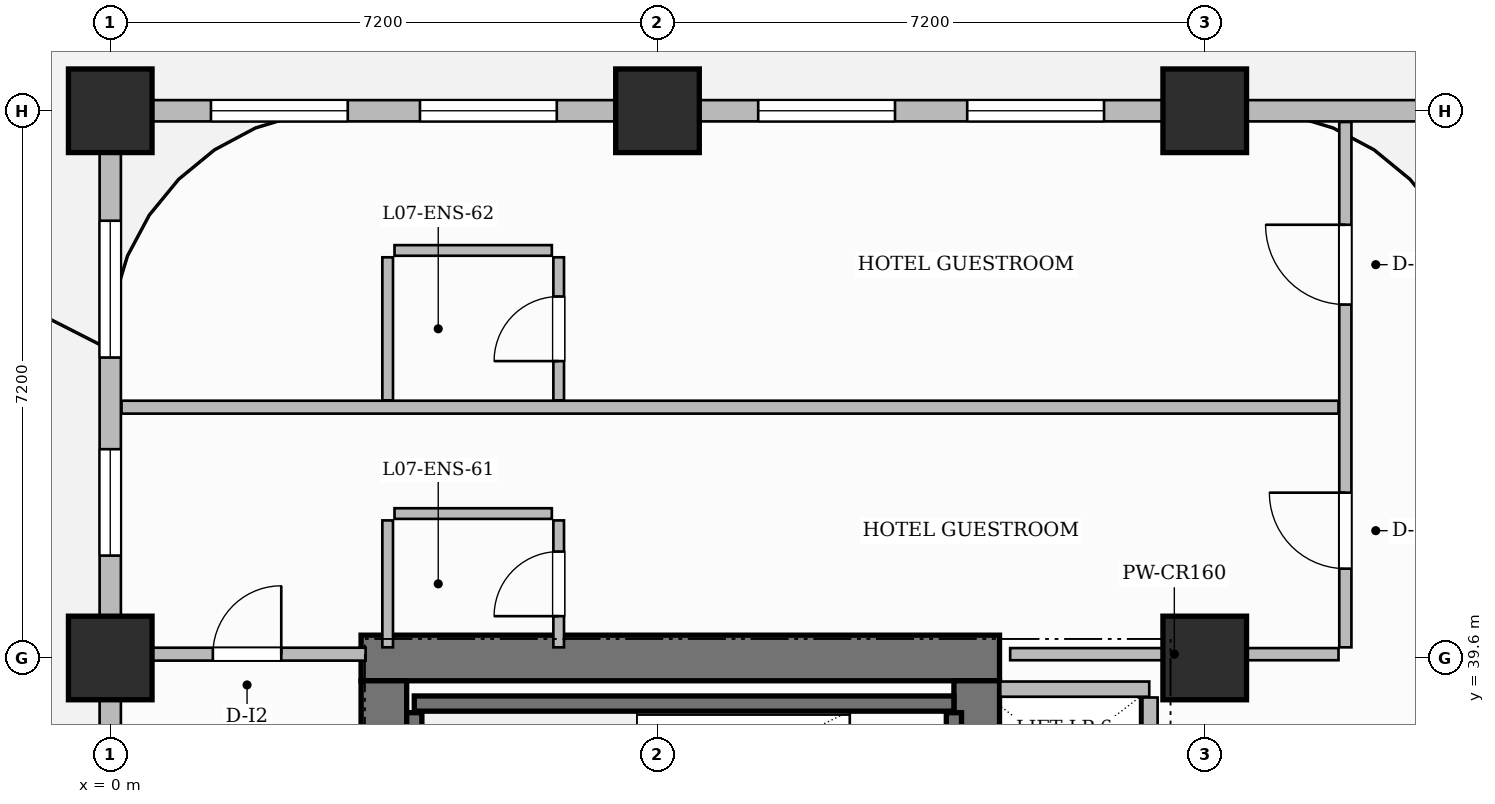
"""IFC4 building model, lengths in metres.
Left out: names, types, materials, properties, quantities, classifications, styles, units other than length and angle.
Written with IfcOpenShell. Run it as: python <this file> out.ifc"""

import sys

from ifc_helpers import new_model, si_unit, direction, frame, frame_2d, origin, origin_2d, place, context, subcontext, project, spatial, rectangle, extrude, source, transform, mapped, element, fill, save


model = new_model("IFC4")
c1 = context("Model", 3, precision=1e-05, world=origin(), true_north=direction((0.0, 1.0)))
c2 = subcontext(c1, "Body", "Model", "MODEL_VIEW")
j1 = project(units=[si_unit("LENGTHUNIT", "METRE"), si_unit("PLANEANGLEUNIT", "RADIAN")], contexts=[c1])
p1 = place(None, origin())
s1 = spatial("IfcSite", under=j1, at=p1, CompositionType="ELEMENT")
p2 = place(p1, origin())
s2 = spatial("IfcBuilding", under=s1, at=p2, CompositionType="ELEMENT")
p3 = place(p2, frame((0.0, 0.0, 36.1)))
s3 = spatial("IfcBuildingStorey", under=s2, at=p3, CompositionType="ELEMENT", Elevation=36.1)
p4 = place(p3, frame((3.3, 39.6, 0.0), z_axis=(0.0, 0.0, 1.0), x_axis=(1.0, 0.0, 0.0)))
e1 = element("IfcWall", 1, at=p4, inside=s3, PredefinedType="SHEAR", context=c2, shape_type="SweptSolid", body=[
    extrude(rectangle(XDim=8.4, YDim=0.6, at=frame_2d((4.2, 0.0))), origin(), (0.0, 0.0, 1.0), 3.7),
])
p5 = place(p3, frame((3.6, 25.5, 0.0), z_axis=(0.0, 0.0, 1.0), x_axis=(0.0, 1.0, 0.0)))
e2 = element("IfcWall", 2, at=p5, inside=s3, PredefinedType="SHEAR", context=c2, shape_type="SweptSolid", body=[
    extrude(rectangle(XDim=13.8, YDim=0.6, at=frame_2d((6.9, 0.0))), origin(), (0.0, 0.0, 1.0), 3.7),
])
p6 = place(p3, frame((11.4, 25.5, 0.0), z_axis=(0.0, 0.0, 1.0), x_axis=(0.0, 1.0, 0.0)))
e3 = element("IfcWall", 3, at=p6, inside=s3, PredefinedType="SHEAR", context=c2, shape_type="SweptSolid", body=[
    extrude(rectangle(XDim=13.8, YDim=0.6, at=frame_2d((6.9, 0.0))), origin(), (0.0, 0.0, 1.0), 3.7),
])
p7 = place(p6, frame((6.47, 0.0, 0.0)))
e4 = element("IfcOpeningElement", 4, at=p7, cuts=e3, PredefinedType="OPENING", context=c2, shape_type="SweptSolid", body=[
    extrude(rectangle(XDim=1.5, YDim=2.2, at=frame_2d((0.75, 1.1))), frame((0.0, 0.31, 0.0), z_axis=(0.0, -1.0, 0.0), x_axis=(1.0, 0.0, 0.0)), (0.0, 0.0, 1.0), 0.62),
])
m1 = source(origin(), c2, "Body", "SweptSolid", [
    extrude(rectangle(XDim=1.1, YDim=1.1, at=origin_2d()), origin(), (0.0, 0.0, 1.0), 3.7),
])
for number, where, z_axis, x_axis in (
    (5, (0.0, 39.6, 0.0), (0.0, 0.0, 1.0), (1.0, 0.0, 0.0)),
    (6, (0.0, 46.8, 0.0), (0.0, 0.0, 1.0), (1.0, 0.0, 0.0)),
    (7, (7.2, 46.8, 0.0), (0.0, 0.0, 1.0), (1.0, 0.0, 0.0)),
    (8, (14.4, 39.6, 0.0), (0.0, 0.0, 1.0), (1.0, 0.0, 0.0)),
    (9, (14.4, 46.8, 0.0), (0.0, 0.0, 1.0), (1.0, 0.0, 0.0)),
):
    element("IfcColumn", number, at=place(p3, frame(where, z_axis=z_axis, x_axis=x_axis)), inside=s3, PredefinedType="COLUMN", context=c2, shape_type="MappedRepresentation", body=[
        mapped(m1, transform((0.0, 0.0, 0.0), scale=1.0)),
    ])
p8 = place(p3, frame((4.0, 39.0, 0.0), z_axis=(0.0, 0.0, 1.0), x_axis=(1.0, 0.0, 0.0)))
e10 = element("IfcWall", 10, at=p8, inside=s3, PredefinedType="SHEAR", context=c2, shape_type="SweptSolid", body=[
    extrude(rectangle(XDim=7.1, YDim=0.2, at=frame_2d((3.55, 0.0))), origin(), (0.0, 0.0, 1.0), 3.7),
])
for number, where, z_axis, x_axis in (
    (11, (4.0, 36.18, 0.0), (0.0, 0.0, 1.0), (0.0, 1.0, 0.0)),
    (12, (11.1, 36.18, 0.0), (0.0, 0.0, 1.0), (0.0, 1.0, 0.0)),
):
    element("IfcWall", number, at=place(p3, frame(where, z_axis=z_axis, x_axis=x_axis)), inside=s3, PredefinedType="SHEAR", context=c2, shape_type="SweptSolid", body=[
        extrude(rectangle(XDim=2.7, YDim=0.2, at=frame_2d((1.35, 0.0))), origin(), (0.0, 0.0, 1.0), 3.7),
    ])
p9 = place(p3, frame((11.71, 39.19, 0.0), z_axis=(0.0, 0.0, 1.0), x_axis=(1.0, 0.0, 0.0)))
e13 = element("IfcWall", 13, at=p9, inside=s3, PredefinedType="PARTITIONING", context=c2, shape_type="SweptSolid", body=[
    extrude(rectangle(XDim=1.96, YDim=0.2, at=frame_2d((0.98, 0.0))), origin(), (0.0, 0.0, 1.0), 3.45),
])
p10 = place(p3, frame((13.68, 34.36, 0.0), z_axis=(0.0, 0.0, 1.0), x_axis=(0.0, 1.0, 0.0)))
e14 = element("IfcWall", 14, at=p10, inside=s3, PredefinedType="PARTITIONING", context=c2, shape_type="SweptSolid", body=[
    extrude(rectangle(XDim=4.72, YDim=0.2, at=frame_2d((2.36, 0.0))), origin(), (0.0, 0.0, 1.0), 3.45),
])
p11 = place(p3, frame((16.25, 39.74, 0.0), z_axis=(0.0, 0.0, 1.0), x_axis=(0.0, 1.0, 0.0)))
e15 = element("IfcWall", 15, at=p11, inside=s3, PredefinedType="PARTITIONING", context=c2, shape_type="SweptSolid", body=[
    extrude(rectangle(XDim=6.912, YDim=0.16, at=frame_2d((3.456, 0.0))), origin(), (0.0, 0.0, 1.0), 3.45),
])
p12 = place(p11, frame((1.035, 0.0, 0.0)))
e16 = element("IfcOpeningElement", 16, at=p12, cuts=e15, PredefinedType="OPENING", context=c2, shape_type="SweptSolid", body=[
    extrude(rectangle(XDim=1.0, YDim=2.2, at=frame_2d((0.5, 1.1))), frame((0.0, 0.09, 0.0), z_axis=(0.0, -1.0, 0.0), x_axis=(1.0, 0.0, 0.0)), (0.0, 0.0, 1.0), 0.18),
])
p13 = place(p11, frame((4.51, 0.0, 0.0)))
e17 = element("IfcOpeningElement", 17, at=p13, cuts=e15, PredefinedType="OPENING", context=c2, shape_type="SweptSolid", body=[
    extrude(rectangle(XDim=1.05, YDim=2.25, at=frame_2d((0.525, 1.125))), frame((0.0, 0.09, 0.0), z_axis=(0.0, -1.0, 0.0), x_axis=(1.0, 0.0, 0.0)), (0.0, 0.0, 1.0), 0.18),
])
p14 = place(p3, frame((11.84, 39.65, 0.0), z_axis=(0.0, 0.0, 1.0), x_axis=(1.0, 0.0, 0.0)))
e18 = element("IfcWall", 18, at=p14, inside=s3, PredefinedType="PARTITIONING", context=c2, shape_type="SweptSolid", body=[
    extrude(rectangle(XDim=4.32, YDim=0.16, at=frame_2d((2.16, 0.0))), origin(), (0.0, 0.0, 1.0), 2.885),
])
p15 = place(p3, frame((0.24, 39.65, 0.0), z_axis=(0.0, 0.0, 1.0), x_axis=(1.0, 0.0, 0.0)))
e19 = element("IfcWall", 19, at=p15, inside=s3, PredefinedType="PARTITIONING", context=c2, shape_type="SweptSolid", body=[
    extrude(rectangle(XDim=3.12, YDim=0.17, at=frame_2d((1.56, 0.0))), origin(), (0.0, 0.0, 1.0), 3.45),
])
p16 = place(p15, frame((1.11, 0.0, 0.0)))
e20 = element("IfcOpeningElement", 20, at=p16, cuts=e19, PredefinedType="OPENING", context=c2, shape_type="SweptSolid", body=[
    extrude(rectangle(XDim=0.9, YDim=2.15, at=frame_2d((0.45, 1.075))), frame((0.0, 0.095, 0.0), z_axis=(0.0, -1.0, 0.0), x_axis=(1.0, 0.0, 0.0)), (0.0, 0.0, 1.0), 0.19),
])
p17 = place(p3, frame((0.148, 42.9, 0.0), z_axis=(0.0, 0.0, 1.0), x_axis=(1.0, 0.0, 0.0)))
e21 = element("IfcWall", 21, at=p17, inside=s3, PredefinedType="PARTITIONING", context=c2, shape_type="SweptSolid", body=[
    extrude(rectangle(XDim=16.012, YDim=0.17, at=frame_2d((8.006, 0.0))), origin(), (0.0, 0.0, 1.0), 3.45),
])
p18 = place(p3, frame((3.65, 39.74, 0.0), z_axis=(0.0, 0.0, 1.0), x_axis=(0.0, 1.0, 0.0)))
e22 = element("IfcWall", 22, at=p18, inside=s3, PredefinedType="PARTITIONING", context=c2, shape_type="SweptSolid", body=[
    extrude(rectangle(XDim=1.67, YDim=0.14, at=frame_2d((0.835, 0.0))), origin(), (0.0, 0.0, 1.0), 3.45),
])
p19 = place(p3, frame((3.74, 41.5, 0.0), z_axis=(0.0, 0.0, 1.0), x_axis=(1.0, 0.0, 0.0)))
e23 = element("IfcWall", 23, at=p19, inside=s3, PredefinedType="PARTITIONING", context=c2, shape_type="SweptSolid", body=[
    extrude(rectangle(XDim=2.07, YDim=0.14, at=frame_2d((1.035, 0.0))), origin(), (0.0, 0.0, 1.0), 2.885),
])
p20 = place(p3, frame((5.9, 39.74, 0.0), z_axis=(0.0, 0.0, 1.0), x_axis=(0.0, 1.0, 0.0)))
e24 = element("IfcWall", 24, at=p20, inside=s3, PredefinedType="PARTITIONING", context=c2, shape_type="SweptSolid", body=[
    extrude(rectangle(XDim=1.67, YDim=0.14, at=frame_2d((0.835, 0.0))), origin(), (0.0, 0.0, 1.0), 3.45),
])
p21 = place(p20, frame((0.41, 0.0, 0.0)))
e25 = element("IfcOpeningElement", 25, at=p21, cuts=e24, PredefinedType="OPENING", context=c2, shape_type="SweptSolid", body=[
    extrude(rectangle(XDim=0.85, YDim=2.1, at=frame_2d((0.425, 1.05))), frame((0.0, 0.08, 0.0), z_axis=(0.0, -1.0, 0.0), x_axis=(1.0, 0.0, 0.0)), (0.0, 0.0, 1.0), 0.16),
])
p22 = place(p3, frame((3.65, 42.99, 0.0), z_axis=(0.0, 0.0, 1.0), x_axis=(0.0, 1.0, 0.0)))
e26 = element("IfcWall", 26, at=p22, inside=s3, PredefinedType="PARTITIONING", context=c2, shape_type="SweptSolid", body=[
    extrude(rectangle(XDim=1.882, YDim=0.14, at=frame_2d((0.941, 0.0))), origin(), (0.0, 0.0, 1.0), 3.45),
])
p23 = place(p3, frame((3.74, 44.962, 0.0), z_axis=(0.0, 0.0, 1.0), x_axis=(1.0, 0.0, 0.0)))
e27 = element("IfcWall", 27, at=p23, inside=s3, PredefinedType="PARTITIONING", context=c2, shape_type="SweptSolid", body=[
    extrude(rectangle(XDim=2.07, YDim=0.14, at=frame_2d((1.035, 0.0))), origin(), (0.0, 0.0, 1.0), 3.45),
])
p24 = place(p3, frame((5.9, 42.99, 0.0), z_axis=(0.0, 0.0, 1.0), x_axis=(0.0, 1.0, 0.0)))
e28 = element("IfcWall", 28, at=p24, inside=s3, PredefinedType="PARTITIONING", context=c2, shape_type="SweptSolid", body=[
    extrude(rectangle(XDim=1.882, YDim=0.14, at=frame_2d((0.941, 0.0))), origin(), (0.0, 0.0, 1.0), 3.45),
])
p25 = place(p24, frame((0.516, 0.0, 0.0)))
e29 = element("IfcOpeningElement", 29, at=p25, cuts=e28, PredefinedType="OPENING", context=c2, shape_type="SweptSolid", body=[
    extrude(rectangle(XDim=0.85, YDim=2.1, at=frame_2d((0.425, 1.05))), frame((0.0, 0.08, 0.0), z_axis=(0.0, -1.0, 0.0), x_axis=(1.0, 0.0, 0.0)), (0.0, 0.0, 1.0), 0.16),
])
p26 = place(p3, frame((0.0, 46.8, 0.0), z_axis=(0.0, 0.0, 1.0), x_axis=(1.0, 0.0, 0.0)))
e30 = element("IfcWall", 30, at=p26, inside=s3, PredefinedType="SOLIDWALL", context=c2, shape_type="SweptSolid", body=[
    extrude(rectangle(XDim=18.0, YDim=0.28, at=frame_2d((9.0, 0.0))), origin(), (0.0, 0.0, 1.0), 2.885),
])
p27 = place(p26, frame((1.325, 0.0, 0.8)))
e31 = element("IfcOpeningElement", 31, at=p27, cuts=e30, PredefinedType="OPENING", context=c2, shape_type="SweptSolid", body=[
    extrude(rectangle(XDim=1.8, YDim=1.85, at=frame_2d((0.9, 0.925))), frame((0.0, 0.15, 0.0), z_axis=(0.0, -1.0, 0.0), x_axis=(1.0, 0.0, 0.0)), (0.0, 0.0, 1.0), 0.3),
])
p28 = place(p26, frame((4.075, 0.0, 0.8)))
e32 = element("IfcOpeningElement", 32, at=p28, cuts=e30, PredefinedType="OPENING", context=c2, shape_type="SweptSolid", body=[
    extrude(rectangle(XDim=1.8, YDim=1.85, at=frame_2d((0.9, 0.925))), frame((0.0, 0.15, 0.0), z_axis=(0.0, -1.0, 0.0), x_axis=(1.0, 0.0, 0.0)), (0.0, 0.0, 1.0), 0.3),
])
p29 = place(p26, frame((8.525, 0.0, 0.8)))
e33 = element("IfcOpeningElement", 33, at=p29, cuts=e30, PredefinedType="OPENING", context=c2, shape_type="SweptSolid", body=[
    extrude(rectangle(XDim=1.8, YDim=1.85, at=frame_2d((0.9, 0.925))), frame((0.0, 0.15, 0.0), z_axis=(0.0, -1.0, 0.0), x_axis=(1.0, 0.0, 0.0)), (0.0, 0.0, 1.0), 0.3),
])
p30 = place(p26, frame((11.275, 0.0, 0.8)))
e34 = element("IfcOpeningElement", 34, at=p30, cuts=e30, PredefinedType="OPENING", context=c2, shape_type="SweptSolid", body=[
    extrude(rectangle(XDim=1.8, YDim=1.85, at=frame_2d((0.9, 0.925))), frame((0.0, 0.15, 0.0), z_axis=(0.0, -1.0, 0.0), x_axis=(1.0, 0.0, 0.0)), (0.0, 0.0, 1.0), 0.3),
])
p31 = place(p3, frame((0.0, 25.25, 0.0), z_axis=(0.0, 0.0, 1.0), x_axis=(0.0, 1.0, 0.0)))
e35 = element("IfcWall", 35, at=p31, inside=s3, PredefinedType="SOLIDWALL", context=c2, shape_type="SweptSolid", body=[
    extrude(rectangle(XDim=21.5, YDim=0.28, at=frame_2d((10.75, 0.0))), origin(), (0.0, 0.0, 1.0), 2.885),
])
p32 = place(p31, frame((1.275, 0.0, 0.8)))
e36 = element("IfcOpeningElement", 36, at=p32, cuts=e35, PredefinedType="OPENING", context=c2, shape_type="SweptSolid", body=[
    extrude(rectangle(XDim=1.8, YDim=1.85, at=frame_2d((0.9, 0.925))), frame((0.0, 0.15, 0.0), z_axis=(0.0, -1.0, 0.0), x_axis=(1.0, 0.0, 0.0)), (0.0, 0.0, 1.0), 0.3),
])
p33 = place(p31, frame((4.025, 0.0, 0.8)))
e37 = element("IfcOpeningElement", 37, at=p33, cuts=e35, PredefinedType="OPENING", context=c2, shape_type="SweptSolid", body=[
    extrude(rectangle(XDim=1.8, YDim=1.85, at=frame_2d((0.9, 0.925))), frame((0.0, 0.15, 0.0), z_axis=(0.0, -1.0, 0.0), x_axis=(1.0, 0.0, 0.0)), (0.0, 0.0, 1.0), 0.3),
])
p34 = place(p31, frame((8.475, 0.0, 0.8)))
e38 = element("IfcOpeningElement", 38, at=p34, cuts=e35, PredefinedType="OPENING", context=c2, shape_type="SweptSolid", body=[
    extrude(rectangle(XDim=1.8, YDim=1.85, at=frame_2d((0.9, 0.925))), frame((0.0, 0.15, 0.0), z_axis=(0.0, -1.0, 0.0), x_axis=(1.0, 0.0, 0.0)), (0.0, 0.0, 1.0), 0.3),
])
p35 = place(p31, frame((11.225, 0.0, 0.8)))
e39 = element("IfcOpeningElement", 39, at=p35, cuts=e35, PredefinedType="OPENING", context=c2, shape_type="SweptSolid", body=[
    extrude(rectangle(XDim=1.8, YDim=1.85, at=frame_2d((0.9, 0.925))), frame((0.0, 0.15, 0.0), z_axis=(0.0, -1.0, 0.0), x_axis=(1.0, 0.0, 0.0)), (0.0, 0.0, 1.0), 0.3),
])
p36 = place(p31, frame((15.697, 0.0, 0.8)))
e40 = element("IfcOpeningElement", 40, at=p36, cuts=e35, PredefinedType="OPENING", context=c2, shape_type="SweptSolid", body=[
    extrude(rectangle(XDim=1.4, YDim=1.85, at=frame_2d((0.7, 0.925))), frame((0.0, 0.15, 0.0), z_axis=(0.0, -1.0, 0.0), x_axis=(1.0, 0.0, 0.0)), (0.0, 0.0, 1.0), 0.3),
])
p37 = place(p31, frame((18.303, 0.0, 0.8)))
e41 = element("IfcOpeningElement", 41, at=p37, cuts=e35, PredefinedType="OPENING", context=c2, shape_type="SweptSolid", body=[
    extrude(rectangle(XDim=1.8, YDim=1.85, at=frame_2d((0.9, 0.925))), frame((0.0, 0.15, 0.0), z_axis=(0.0, -1.0, 0.0), x_axis=(1.0, 0.0, 0.0)), (0.0, 0.0, 1.0), 0.3),
])
m2 = source(origin(), c2, "Body", "SweptSolid", [
    extrude(rectangle(XDim=0.9, YDim=2.15, at=frame_2d((0.45, 1.075))), frame((0.0, 0.025, 0.0), z_axis=(0.0, -1.0, 0.0), x_axis=(1.0, 0.0, 0.0)), (0.0, 0.0, 1.0), 0.05),
])
p38 = place(p16, origin())
e42 = element("IfcDoor", 42, at=p38, inside=s3, OperationType="SINGLE_SWING_RIGHT", PredefinedType="DOOR", context=c2, shape_type="MappedRepresentation", body=[
    mapped(m2, transform((0.0, 0.0, 0.0), scale=1.0)),
])
fill(e20, e42)
m3 = source(origin(), c2, "Body", "SweptSolid", [
    extrude(rectangle(XDim=0.85, YDim=2.1, at=frame_2d((0.425, 1.05))), frame((0.0, 0.025, 0.0), z_axis=(0.0, -1.0, 0.0), x_axis=(1.0, 0.0, 0.0)), (0.0, 0.0, 1.0), 0.05),
])
p39 = place(p21, origin())
e43 = element("IfcDoor", 43, at=p39, inside=s3, OperationType="SINGLE_SWING_LEFT", PredefinedType="DOOR", context=c2, shape_type="MappedRepresentation", body=[
    mapped(m3, transform((0.0, 0.0, 0.0), scale=1.0)),
])
fill(e25, e43)
m4 = source(origin(), c2, "Body", "SweptSolid", [
    extrude(rectangle(XDim=1.0, YDim=2.2, at=frame_2d((0.5, 1.1))), frame((0.0, 0.025, 0.0), z_axis=(0.0, -1.0, 0.0), x_axis=(1.0, 0.0, 0.0)), (0.0, 0.0, 1.0), 0.05),
])
p40 = place(p12, origin())
e44 = element("IfcDoor", 44, at=p40, inside=s3, OperationType="SINGLE_SWING_RIGHT", PredefinedType="DOOR", context=c2, shape_type="MappedRepresentation", body=[
    mapped(m4, transform((0.0, 0.0, 0.0), scale=1.0)),
])
fill(e16, e44)
p41 = place(p25, origin())
e45 = element("IfcDoor", 45, at=p41, inside=s3, OperationType="SINGLE_SWING_LEFT", PredefinedType="DOOR", context=c2, shape_type="MappedRepresentation", body=[
    mapped(m3, transform((0.0, 0.0, 0.0), scale=1.0)),
])
fill(e29, e45)
m5 = source(origin(), c2, "Body", "SweptSolid", [
    extrude(rectangle(XDim=1.05, YDim=2.25, at=frame_2d((0.525, 1.125))), frame((0.0, 0.025, 0.0), z_axis=(0.0, -1.0, 0.0), x_axis=(1.0, 0.0, 0.0)), (0.0, 0.0, 1.0), 0.05),
])
p42 = place(p13, origin())
e46 = element("IfcDoor", 46, at=p42, inside=s3, OperationType="SINGLE_SWING_RIGHT", PredefinedType="DOOR", context=c2, shape_type="MappedRepresentation", body=[
    mapped(m5, transform((0.0, 0.0, 0.0), scale=1.0)),
])
fill(e17, e46)
m6 = source(origin(), c2, "Body", "SweptSolid", [
    extrude(rectangle(XDim=1.8, YDim=1.85, at=frame_2d((0.9, 0.925))), frame((0.0, 0.03, 0.0), z_axis=(0.0, -1.0, 0.0), x_axis=(1.0, 0.0, 0.0)), (0.0, 0.0, 1.0), 0.06),
])
p43 = place(p27, origin())
e47 = element("IfcWindow", 47, at=p43, inside=s3, PartitioningType="DOUBLE_PANEL_VERTICAL", PredefinedType="WINDOW", context=c2, shape_type="MappedRepresentation", body=[
    mapped(m6, transform((0.0, 0.0, 0.0), scale=1.0)),
])
fill(e31, e47)
p44 = place(p28, origin())
e48 = element("IfcWindow", 48, at=p44, inside=s3, PartitioningType="DOUBLE_PANEL_VERTICAL", PredefinedType="WINDOW", context=c2, shape_type="MappedRepresentation", body=[
    mapped(m6, transform((0.0, 0.0, 0.0), scale=1.0)),
])
fill(e32, e48)
p45 = place(p29, origin())
e49 = element("IfcWindow", 49, at=p45, inside=s3, PartitioningType="DOUBLE_PANEL_VERTICAL", PredefinedType="WINDOW", context=c2, shape_type="MappedRepresentation", body=[
    mapped(m6, transform((0.0, 0.0, 0.0), scale=1.0)),
])
fill(e33, e49)
p46 = place(p30, origin())
e50 = element("IfcWindow", 50, at=p46, inside=s3, PartitioningType="DOUBLE_PANEL_VERTICAL", PredefinedType="WINDOW", context=c2, shape_type="MappedRepresentation", body=[
    mapped(m6, transform((0.0, 0.0, 0.0), scale=1.0)),
])
fill(e34, e50)
m7 = source(origin(), c2, "Body", "SweptSolid", [
    extrude(rectangle(XDim=1.4, YDim=1.85, at=frame_2d((0.7, 0.925))), frame((0.0, 0.03, 0.0), z_axis=(0.0, -1.0, 0.0), x_axis=(1.0, 0.0, 0.0)), (0.0, 0.0, 1.0), 0.06),
])
p47 = place(p36, origin())
e51 = element("IfcWindow", 51, at=p47, inside=s3, PartitioningType="SINGLE_PANEL", PredefinedType="WINDOW", context=c2, shape_type="MappedRepresentation", body=[
    mapped(m7, transform((0.0, 0.0, 0.0), scale=1.0)),
])
fill(e40, e51)
p48 = place(p37, origin())
e52 = element("IfcWindow", 52, at=p48, inside=s3, PartitioningType="DOUBLE_PANEL_VERTICAL", PredefinedType="WINDOW", context=c2, shape_type="MappedRepresentation", body=[
    mapped(m6, transform((0.0, 0.0, 0.0), scale=1.0)),
])
fill(e41, e52)
save(model, sys.argv[1])
